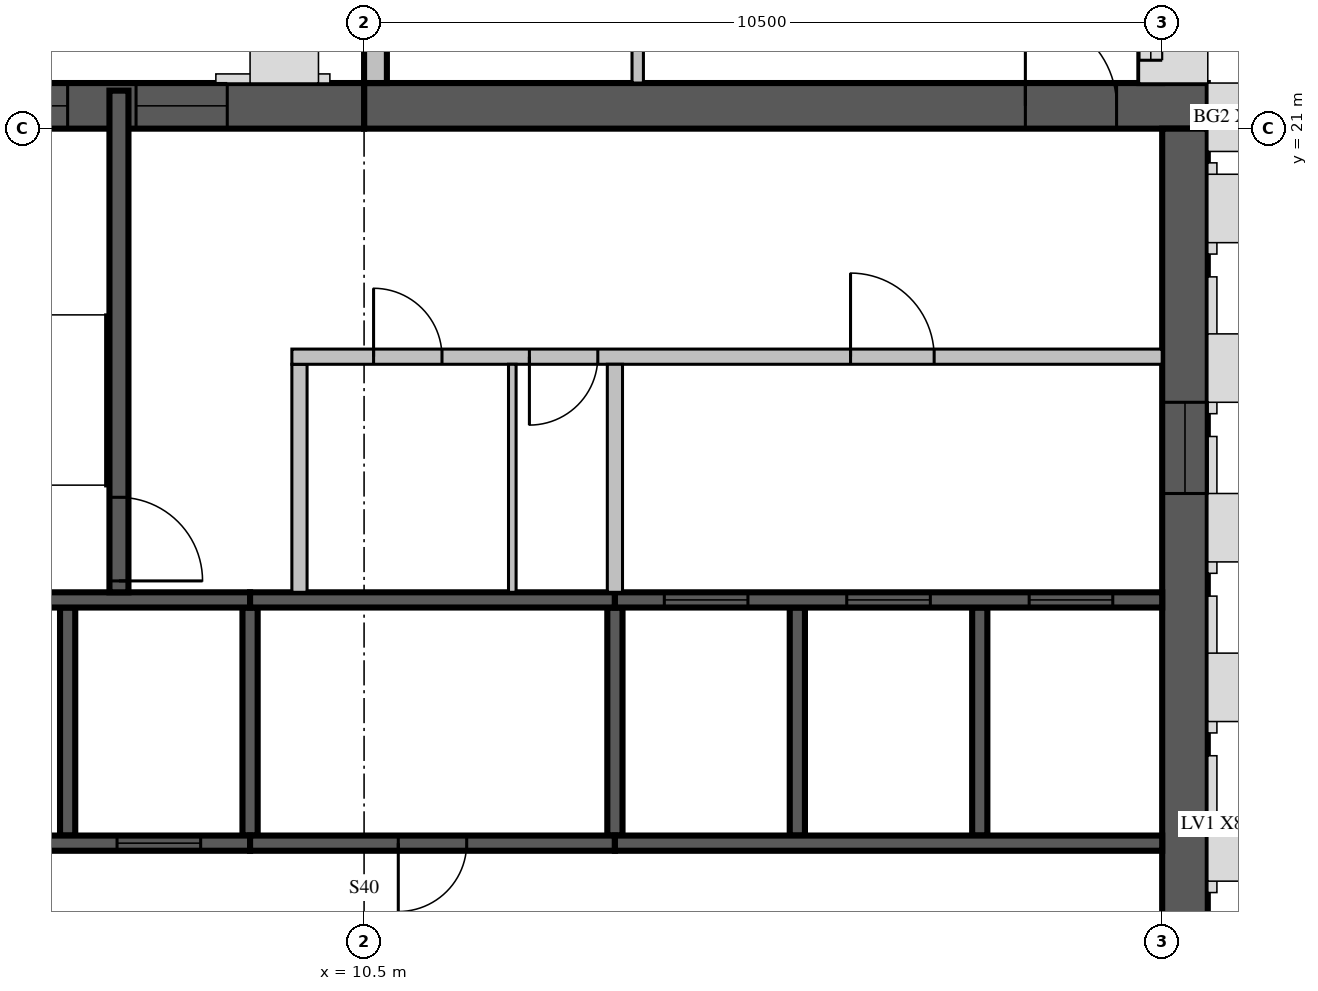
"""IFC4 building model, lengths in metres.
Left out: names, types, materials, properties, quantities, classifications, styles, units other than length and angle.
Written with IfcOpenShell. Run it as: python <this file> out.ifc"""

import sys

from ifc_helpers import new_model, si_unit, direction, frame, frame_2d, origin, place, context, subcontext, project, spatial, rectangle, extrude, source, transform, mapped, element, fill, save


model = new_model("IFC4")
c1 = context("Model", 3, precision=1e-05, world=origin(), true_north=direction((0.0, 1.0)))
c2 = subcontext(c1, "Body", "Model", "MODEL_VIEW")
j1 = project(units=[si_unit("LENGTHUNIT", "METRE"), si_unit("PLANEANGLEUNIT", "RADIAN")], contexts=[c1])
p1 = place(None, origin())
s1 = spatial("IfcSite", under=j1, at=p1, CompositionType="ELEMENT")
p2 = place(p1, origin())
s2 = spatial("IfcBuilding", under=s1, at=p2, CompositionType="ELEMENT")
p3 = place(p2, frame((0.0, 0.0, 288.0)))
s3 = spatial("IfcBuildingStorey", under=s2, at=p3, CompositionType="ELEMENT", Elevation=288.0)
m1 = source(origin(), c2, "Body", "SweptSolid", [
    extrude(rectangle(XDim=11.1, YDim=0.6, at=frame_2d((5.55, 0.0))), origin(), (0.0, 0.0, 1.0), 3.5),
])
p4 = place(p3, frame((10.5, 21.3, 0.0), z_axis=(0.0, 0.0, 1.0), x_axis=(1.0, 0.0, 0.0)))
e1 = element("IfcWall", 1, at=p4, inside=s3, PredefinedType="SHEAR", context=c2, shape_type="MappedRepresentation", body=[
    mapped(m1, transform((0.0, 0.0, 0.0), scale=1.0)),
])
m2 = source(origin(), c2, "Body", "SweptSolid", [
    extrude(rectangle(XDim=1.2, YDim=2.1, at=frame_2d((0.6, 1.05))), frame((0.0, 0.31, 0.0), z_axis=(0.0, -1.0, 0.0), x_axis=(1.0, 0.0, 0.0)), (0.0, 0.0, 1.0), 0.62),
])
p5 = place(p4, frame((8.7, 0.0, 0.0)))
e2 = element("IfcOpeningElement", 2, at=p5, cuts=e1, PredefinedType="OPENING", context=c2, shape_type="MappedRepresentation", body=[
    mapped(m2, transform((0.0, 0.0, 0.0), scale=1.0)),
])
m3 = source(origin(), c2, "Body", "SweptSolid", [
    extrude(rectangle(XDim=10.5, YDim=0.6, at=frame_2d((5.25, 0.0))), origin(), (0.0, 0.0, 1.0), 3.5),
])
p6 = place(p3, frame((21.3, 10.5, 0.0), z_axis=(0.0, 0.0, 1.0), x_axis=(0.0, 1.0, 0.0)))
e3 = element("IfcWall", 3, at=p6, inside=s3, PredefinedType="SHEAR", context=c2, shape_type="MappedRepresentation", body=[
    mapped(m3, transform((0.0, 0.0, 0.0), scale=1.0)),
])
m4 = source(origin(), c2, "Body", "SweptSolid", [
    extrude(rectangle(XDim=1.2, YDim=2.4, at=frame_2d((0.6, 1.2))), frame((0.0, 0.31, 0.0), z_axis=(0.0, -1.0, 0.0), x_axis=(1.0, 0.0, 0.0)), (0.0, 0.0, 1.0), 0.62),
])
p7 = place(p6, frame((5.7, 0.0, 0.6)))
e4 = element("IfcOpeningElement", 4, at=p7, cuts=e3, PredefinedType="OPENING", context=c2, shape_type="MappedRepresentation", body=[
    mapped(m4, transform((0.0, 0.0, 0.0), scale=1.0)),
])
m5 = source(origin(), c2, "Body", "SweptSolid", [
    extrude(rectangle(XDim=6.6, YDim=0.6, at=frame_2d((3.3, 0.0))), origin(), (0.0, 0.0, 1.0), 3.5),
])
p8 = place(p3, frame((3.9, 21.3, 0.0), z_axis=(0.0, 0.0, 1.0), x_axis=(1.0, 0.0, 0.0)))
e5 = element("IfcWall", 5, at=p8, inside=s3, PredefinedType="SHEAR", context=c2, shape_type="MappedRepresentation", body=[
    mapped(m5, transform((0.0, 0.0, 0.0), scale=1.0)),
])
p9 = place(p8, frame((1.5, 0.0, 0.6)))
e6 = element("IfcOpeningElement", 6, at=p9, cuts=e5, PredefinedType="OPENING", context=c2, shape_type="MappedRepresentation", body=[
    mapped(m4, transform((0.0, 0.0, 0.0), scale=1.0)),
])
p10 = place(p8, frame((3.6, 0.0, 0.6)))
e7 = element("IfcOpeningElement", 7, at=p10, cuts=e5, PredefinedType="OPENING", context=c2, shape_type="MappedRepresentation", body=[
    mapped(m4, transform((0.0, 0.0, 0.0), scale=1.0)),
])
m6 = source(origin(), c2, "Body", "SweptSolid", [
    extrude(rectangle(XDim=7.45, YDim=0.3, at=frame_2d((3.725, 0.0))), origin(), (0.0, 0.0, 1.0), 3.1),
])
p11 = place(p3, frame((20.85, 21.6, 0.0), z_axis=(0.0, 0.0, 1.0), x_axis=(0.0, 1.0, 0.0)))
e8 = element("IfcWall", 8, at=p11, inside=s3, PredefinedType="STANDARD", context=c2, shape_type="MappedRepresentation", body=[
    mapped(m6, transform((0.0, 0.0, 0.0), scale=1.0)),
])
m7 = source(origin(), c2, "Body", "SweptSolid", [
    extrude(rectangle(XDim=2.4, YDim=2.0, at=frame_2d((1.2, 1.0))), frame((0.0, 0.16, 0.0), z_axis=(0.0, -1.0, 0.0), x_axis=(1.0, 0.0, 0.0)), (0.0, 0.0, 1.0), 0.32),
])
p12 = place(p11, frame((0.3, 0.0, 0.6)))
e9 = element("IfcOpeningElement", 9, at=p12, cuts=e8, PredefinedType="OPENING", context=c2, shape_type="MappedRepresentation", body=[
    mapped(m7, transform((0.0, 0.0, 0.0), scale=1.0)),
])
m8 = source(origin(), c2, "Body", "SweptSolid", [
    extrude(rectangle(XDim=3.0, YDim=2.0, at=frame_2d((1.5, 1.0))), frame((0.0, 0.16, 0.0), z_axis=(0.0, -1.0, 0.0), x_axis=(1.0, 0.0, 0.0)), (0.0, 0.0, 1.0), 0.32),
])
p13 = place(p11, frame((4.2, 0.0, 0.6)))
e10 = element("IfcOpeningElement", 10, at=p13, cuts=e8, PredefinedType="OPENING", context=c2, shape_type="MappedRepresentation", body=[
    mapped(m8, transform((0.0, 0.0, 0.0), scale=1.0)),
])
p14 = place(p3, frame((10.65, 26.88, 0.0), z_axis=(0.0, 0.0, 1.0), x_axis=(0.0, -1.0, 0.0)))
e11 = element("IfcWall", 11, at=p14, inside=s3, PredefinedType="STANDARD", context=c2, shape_type="SweptSolid", body=[
    extrude(rectangle(XDim=5.28, YDim=0.3, at=frame_2d((2.64, 0.0))), origin(), (0.0, 0.0, 1.0), 3.1),
])
m9 = source(origin(), c2, "Body", "SweptSolid", [
    extrude(rectangle(XDim=3.6, YDim=2.0, at=frame_2d((1.8, 1.0))), frame((0.0, 0.16, 0.0), z_axis=(0.0, -1.0, 0.0), x_axis=(1.0, 0.0, 0.0)), (0.0, 0.0, 1.0), 0.32),
])
p15 = place(p14, frame((1.14, 0.0, 0.6)))
e12 = element("IfcOpeningElement", 12, at=p15, cuts=e11, PredefinedType="OPENING", context=c2, shape_type="MappedRepresentation", body=[
    mapped(m9, transform((0.0, 0.0, 0.0), scale=1.0)),
])
m10 = source(origin(), c2, "Body", "SweptSolid", [
    extrude(rectangle(XDim=3.0, YDim=0.2, at=frame_2d((1.5, 0.0))), origin(), (0.0, 0.0, 1.0), 3.5),
])
p16 = place(p3, frame((6.6, 11.7, 0.0), z_axis=(0.0, 0.0, 1.0), x_axis=(0.0, 1.0, 0.0)))
e13 = element("IfcWall", 13, at=p16, inside=s3, PredefinedType="SOLIDWALL", context=c2, shape_type="MappedRepresentation", body=[
    mapped(m10, transform((0.0, 0.0, 0.0), scale=1.0)),
])
m11 = source(origin(), c2, "Body", "SweptSolid", [
    extrude(rectangle(XDim=3.0, YDim=0.2, at=frame_2d((1.5, 0.0))), origin(), (0.0, 0.0, 1.0), 3.1),
])
for number, where, z_axis, x_axis in (
    (14, (9.0, 11.7, 0.0), (0.0, 0.0, 1.0), (0.0, 1.0, 0.0)),
    (15, (13.8, 11.7, 0.0), (0.0, 0.0, 1.0), (0.0, 1.0, 0.0)),
):
    element("IfcWall", number, at=place(p3, frame(where, z_axis=z_axis, x_axis=x_axis)), inside=s3, PredefinedType="SOLIDWALL", context=c2, shape_type="MappedRepresentation", body=[
        mapped(m11, transform((0.0, 0.0, 0.0), scale=1.0)),
    ])
for number, where, z_axis, x_axis in (
    (16, (16.2, 11.7, 0.0), (0.0, 0.0, 1.0), (0.0, 1.0, 0.0)),
    (17, (18.6, 11.7, 0.0), (0.0, 0.0, 1.0), (0.0, 1.0, 0.0)),
):
    element("IfcWall", number, at=place(p3, frame(where, z_axis=z_axis, x_axis=x_axis)), inside=s3, PredefinedType="SOLIDWALL", context=c2, shape_type="MappedRepresentation", body=[
        mapped(m10, transform((0.0, 0.0, 0.0), scale=1.0)),
    ])
m12 = source(origin(), c2, "Body", "SweptSolid", [
    extrude(rectangle(XDim=4.8, YDim=0.2, at=frame_2d((2.4, 0.0))), origin(), (0.0, 0.0, 1.0), 3.5),
])
p17 = place(p3, frame((4.2, 11.6, 0.0), z_axis=(0.0, 0.0, 1.0), x_axis=(1.0, 0.0, 0.0)))
e18 = element("IfcWall", 18, at=p17, inside=s3, PredefinedType="SOLIDWALL", context=c2, shape_type="MappedRepresentation", body=[
    mapped(m12, transform((0.0, 0.0, 0.0), scale=1.0)),
])
m13 = source(origin(), c2, "Body", "SweptSolid", [
    extrude(rectangle(XDim=1.1, YDim=2.1, at=frame_2d((0.55, 1.05))), frame((0.0, 0.11, 0.0), z_axis=(0.0, -1.0, 0.0), x_axis=(1.0, 0.0, 0.0)), (0.0, 0.0, 1.0), 0.22),
])
p18 = place(p17, frame((0.65, 0.0, 0.0)))
e19 = element("IfcOpeningElement", 19, at=p18, cuts=e18, PredefinedType="OPENING", context=c2, shape_type="MappedRepresentation", body=[
    mapped(m13, transform((0.0, 0.0, 0.0), scale=1.0)),
])
p19 = place(p17, frame((3.05, 0.0, 0.0)))
e20 = element("IfcOpeningElement", 20, at=p19, cuts=e18, PredefinedType="OPENING", context=c2, shape_type="MappedRepresentation", body=[
    mapped(m13, transform((0.0, 0.0, 0.0), scale=1.0)),
])
m14 = source(origin(), c2, "Body", "SweptSolid", [
    extrude(rectangle(XDim=4.8, YDim=0.2, at=frame_2d((2.4, 0.0))), origin(), (0.0, 0.0, 1.0), 3.1),
])
p20 = place(p3, frame((9.0, 11.6, 0.0), z_axis=(0.0, 0.0, 1.0), x_axis=(1.0, 0.0, 0.0)))
e21 = element("IfcWall", 21, at=p20, inside=s3, PredefinedType="SOLIDWALL", context=c2, shape_type="MappedRepresentation", body=[
    mapped(m14, transform((0.0, 0.0, 0.0), scale=1.0)),
])
m15 = source(origin(), c2, "Body", "SweptSolid", [
    extrude(rectangle(XDim=0.9, YDim=2.1, at=frame_2d((0.45, 1.05))), frame((0.0, 0.11, 0.0), z_axis=(0.0, -1.0, 0.0), x_axis=(1.0, 0.0, 0.0)), (0.0, 0.0, 1.0), 0.22),
])
p21 = place(p20, frame((1.95, 0.0, 0.0)))
e22 = element("IfcOpeningElement", 22, at=p21, cuts=e21, PredefinedType="OPENING", context=c2, shape_type="MappedRepresentation", body=[
    mapped(m15, transform((0.0, 0.0, 0.0), scale=1.0)),
])
m16 = source(origin(), c2, "Body", "SweptSolid", [
    extrude(rectangle(XDim=7.2, YDim=0.2, at=frame_2d((3.6, 0.0))), origin(), (0.0, 0.0, 1.0), 3.5),
])
p22 = place(p3, frame((13.8, 11.6, 0.0), z_axis=(0.0, 0.0, 1.0), x_axis=(1.0, 0.0, 0.0)))
e23 = element("IfcWall", 23, at=p22, inside=s3, PredefinedType="SOLIDWALL", context=c2, shape_type="MappedRepresentation", body=[
    mapped(m16, transform((0.0, 0.0, 0.0), scale=1.0)),
])
p23 = place(p3, frame((4.2, 14.8, 0.0), z_axis=(0.0, 0.0, 1.0), x_axis=(1.0, 0.0, 0.0)))
e24 = element("IfcWall", 24, at=p23, inside=s3, PredefinedType="SOLIDWALL", context=c2, shape_type="MappedRepresentation", body=[
    mapped(m12, transform((0.0, 0.0, 0.0), scale=1.0)),
])
p24 = place(p3, frame((9.0, 14.8, 0.0), z_axis=(0.0, 0.0, 1.0), x_axis=(1.0, 0.0, 0.0)))
e25 = element("IfcWall", 25, at=p24, inside=s3, PredefinedType="SOLIDWALL", context=c2, shape_type="MappedRepresentation", body=[
    mapped(m14, transform((0.0, 0.0, 0.0), scale=1.0)),
])
p25 = place(p3, frame((13.8, 14.8, 0.0), z_axis=(0.0, 0.0, 1.0), x_axis=(1.0, 0.0, 0.0)))
e26 = element("IfcWall", 26, at=p25, inside=s3, PredefinedType="SOLIDWALL", context=c2, shape_type="MappedRepresentation", body=[
    mapped(m16, transform((0.0, 0.0, 0.0), scale=1.0)),
])
p26 = place(p25, frame((0.65, 0.0, 0.0)))
e27 = element("IfcOpeningElement", 27, at=p26, cuts=e26, PredefinedType="OPENING", context=c2, shape_type="MappedRepresentation", body=[
    mapped(m13, transform((0.0, 0.0, 0.0), scale=1.0)),
])
p27 = place(p25, frame((3.05, 0.0, 0.0)))
e28 = element("IfcOpeningElement", 28, at=p27, cuts=e26, PredefinedType="OPENING", context=c2, shape_type="MappedRepresentation", body=[
    mapped(m13, transform((0.0, 0.0, 0.0), scale=1.0)),
])
p28 = place(p25, frame((5.45, 0.0, 0.0)))
e29 = element("IfcOpeningElement", 29, at=p28, cuts=e26, PredefinedType="OPENING", context=c2, shape_type="MappedRepresentation", body=[
    mapped(m13, transform((0.0, 0.0, 0.0), scale=1.0)),
])
m17 = source(origin(), c2, "Body", "SweptSolid", [
    extrude(rectangle(XDim=6.6, YDim=0.25, at=frame_2d((3.3, 0.0))), origin(), (0.0, 0.0, 1.0), 3.1),
])
p29 = place(p3, frame((7.275, 14.9, 0.0), z_axis=(0.0, 0.0, 1.0), x_axis=(0.0, 1.0, 0.0)))
e30 = element("IfcWall", 30, at=p29, inside=s3, PredefinedType="SOLIDWALL", context=c2, shape_type="MappedRepresentation", body=[
    mapped(m17, transform((0.0, 0.0, 0.0), scale=1.0)),
])
m18 = source(origin(), c2, "Body", "SweptSolid", [
    extrude(rectangle(XDim=1.1, YDim=2.1, at=frame_2d((0.55, 1.05))), frame((0.0, 0.135, 0.0), z_axis=(0.0, -1.0, 0.0), x_axis=(1.0, 0.0, 0.0)), (0.0, 0.0, 1.0), 0.27),
])
p30 = place(p29, frame((0.15, 0.0, 0.0)))
e31 = element("IfcOpeningElement", 31, at=p30, cuts=e30, PredefinedType="OPENING", context=c2, shape_type="MappedRepresentation", body=[
    mapped(m18, transform((0.0, 0.0, 0.0), scale=1.0)),
])
m19 = source(origin(), c2, "Body", "SweptSolid", [
    extrude(rectangle(XDim=3.0, YDim=0.2, at=frame_2d((1.5, 0.0))), origin(), (0.0, 0.0, 1.0), 3.1),
])
p31 = place(p3, frame((9.65, 14.9, 0.0), z_axis=(0.0, 0.0, 1.0), x_axis=(0.0, 1.0, 0.0)))
e32 = element("IfcWall", 32, at=p31, inside=s3, PredefinedType="PARTITIONING", context=c2, shape_type="MappedRepresentation", body=[
    mapped(m19, transform((0.0, 0.0, 0.0), scale=1.0)),
])
m20 = source(origin(), c2, "Body", "SweptSolid", [
    extrude(rectangle(XDim=11.45, YDim=0.2, at=frame_2d((5.725, 0.0))), origin(), (0.0, 0.0, 1.0), 3.1),
])
p32 = place(p3, frame((9.55, 18.0, 0.0), z_axis=(0.0, 0.0, 1.0), x_axis=(1.0, 0.0, 0.0)))
e33 = element("IfcWall", 33, at=p32, inside=s3, PredefinedType="PARTITIONING", context=c2, shape_type="MappedRepresentation", body=[
    mapped(m20, transform((0.0, 0.0, 0.0), scale=1.0)),
])
p33 = place(p32, frame((1.075, 0.0, 0.0)))
e34 = element("IfcOpeningElement", 34, at=p33, cuts=e33, PredefinedType="OPENING", context=c2, shape_type="MappedRepresentation", body=[
    mapped(m15, transform((0.0, 0.0, 0.0), scale=1.0)),
])
p34 = place(p32, frame((3.125, 0.0, 0.0)))
e35 = element("IfcOpeningElement", 35, at=p34, cuts=e33, PredefinedType="OPENING", context=c2, shape_type="MappedRepresentation", body=[
    mapped(m15, transform((0.0, 0.0, 0.0), scale=1.0)),
])
p35 = place(p32, frame((7.35, 0.0, 0.0)))
e36 = element("IfcOpeningElement", 36, at=p35, cuts=e33, PredefinedType="OPENING", context=c2, shape_type="MappedRepresentation", body=[
    mapped(m13, transform((0.0, 0.0, 0.0), scale=1.0)),
])
p36 = place(p3, frame((13.8, 14.9, 0.0), z_axis=(0.0, 0.0, 1.0), x_axis=(0.0, 1.0, 0.0)))
e37 = element("IfcWall", 37, at=p36, inside=s3, PredefinedType="PARTITIONING", context=c2, shape_type="MappedRepresentation", body=[
    mapped(m19, transform((0.0, 0.0, 0.0), scale=1.0)),
])
m21 = source(origin(), c2, "Body", "SweptSolid", [
    extrude(rectangle(XDim=3.0, YDim=0.1, at=frame_2d((1.5, 0.0))), origin(), (0.0, 0.0, 1.0), 3.1),
])
p37 = place(p3, frame((12.45, 14.9, 0.0), z_axis=(0.0, 0.0, 1.0), x_axis=(0.0, 1.0, 0.0)))
e38 = element("IfcWall", 38, at=p37, inside=s3, PredefinedType="PARTITIONING", context=c2, shape_type="MappedRepresentation", body=[
    mapped(m21, transform((0.0, 0.0, 0.0), scale=1.0)),
])
m22 = source(origin(), c2, "Body", "SweptSolid", [
    extrude(rectangle(XDim=7.725, YDim=0.15, at=frame_2d((3.862, 0.0))), origin(), (0.0, 0.0, 1.0), 3.1),
])
p38 = place(p3, frame((14.1, 29.325, 0.0), z_axis=(0.0, 0.0, 1.0), x_axis=(0.0, -1.0, 0.0)))
e39 = element("IfcWall", 39, at=p38, inside=s3, PredefinedType="PARTITIONING", context=c2, shape_type="MappedRepresentation", body=[
    mapped(m22, transform((0.0, 0.0, 0.0), scale=1.0)),
])
m23 = source(origin(), c2, "Body", "SweptSolid", [
    extrude(rectangle(XDim=1.0, YDim=2.1, at=frame_2d((0.5, 1.05))), frame((0.0, 0.085, 0.0), z_axis=(0.0, -1.0, 0.0), x_axis=(1.0, 0.0, 0.0)), (0.0, 0.0, 1.0), 0.17),
])
p39 = place(p38, frame((6.275, 0.0, 0.0)))
e40 = element("IfcOpeningElement", 40, at=p39, cuts=e39, PredefinedType="OPENING", context=c2, shape_type="MappedRepresentation", body=[
    mapped(m23, transform((0.0, 0.0, 0.0), scale=1.0)),
])
m24 = source(origin(), c2, "Body", "SweptSolid", [
    extrude(rectangle(XDim=2.4, YDim=2.0, at=frame_2d((1.2, 1.0))), frame((0.0, 0.03, 0.0), z_axis=(0.0, -1.0, 0.0), x_axis=(1.0, 0.0, 0.0)), (0.0, 0.0, 1.0), 0.06),
])
p40 = place(p12, origin())
e41 = element("IfcWindow", 41, at=p40, inside=s3, PartitioningType="SINGLE_PANEL", PredefinedType="WINDOW", context=c2, shape_type="MappedRepresentation", body=[
    mapped(m24, transform((0.0, 0.0, 0.0), scale=1.0)),
])
fill(e9, e41)
m25 = source(origin(), c2, "Body", "SweptSolid", [
    extrude(rectangle(XDim=1.1, YDim=2.1, at=frame_2d((0.55, 1.05))), frame((0.0, 0.025, 0.0), z_axis=(0.0, -1.0, 0.0), x_axis=(1.0, 0.0, 0.0)), (0.0, 0.0, 1.0), 0.05),
])
p41 = place(p19, origin())
e42 = element("IfcDoor", 42, at=p41, inside=s3, OperationType="SLIDING_TO_LEFT", PredefinedType="DOOR", context=c2, shape_type="MappedRepresentation", body=[
    mapped(m25, transform((0.0, 0.0, 0.0), scale=1.0)),
])
fill(e20, e42)
m26 = source(origin(), c2, "Body", "SweptSolid", [
    extrude(rectangle(XDim=0.9, YDim=2.1, at=frame_2d((0.45, 1.05))), frame((0.0, 0.025, 0.0), z_axis=(0.0, -1.0, 0.0), x_axis=(1.0, 0.0, 0.0)), (0.0, 0.0, 1.0), 0.05),
])
p42 = place(p21, origin())
e43 = element("IfcDoor", 43, at=p42, inside=s3, OperationType="SINGLE_SWING_RIGHT", PredefinedType="DOOR", context=c2, shape_type="MappedRepresentation", body=[
    mapped(m26, transform((0.0, 0.0, 0.0), scale=1.0)),
])
fill(e22, e43)
p43 = place(p26, origin())
e44 = element("IfcDoor", 44, at=p43, inside=s3, OperationType="SLIDING_TO_LEFT", PredefinedType="DOOR", context=c2, shape_type="MappedRepresentation", body=[
    mapped(m25, transform((0.0, 0.0, 0.0), scale=1.0)),
])
fill(e27, e44)
p44 = place(p27, origin())
e45 = element("IfcDoor", 45, at=p44, inside=s3, OperationType="SLIDING_TO_LEFT", PredefinedType="DOOR", context=c2, shape_type="MappedRepresentation", body=[
    mapped(m25, transform((0.0, 0.0, 0.0), scale=1.0)),
])
fill(e28, e45)
p45 = place(p28, origin())
e46 = element("IfcDoor", 46, at=p45, inside=s3, OperationType="SLIDING_TO_LEFT", PredefinedType="DOOR", context=c2, shape_type="MappedRepresentation", body=[
    mapped(m25, transform((0.0, 0.0, 0.0), scale=1.0)),
])
fill(e29, e46)
p46 = place(p30, origin())
e47 = element("IfcDoor", 47, at=p46, inside=s3, OperationType="SINGLE_SWING_RIGHT", PredefinedType="DOOR", context=c2, shape_type="MappedRepresentation", body=[
    mapped(m25, transform((0.0, 0.0, 0.0), scale=1.0)),
])
fill(e31, e47)
p47 = place(p33, origin())
e48 = element("IfcDoor", 48, at=p47, inside=s3, OperationType="SINGLE_SWING_LEFT", PredefinedType="DOOR", context=c2, shape_type="MappedRepresentation", body=[
    mapped(m26, transform((0.0, 0.0, 0.0), scale=1.0)),
])
fill(e34, e48)
p48 = place(p34, origin())
e49 = element("IfcDoor", 49, at=p48, inside=s3, OperationType="SINGLE_SWING_RIGHT", PredefinedType="DOOR", context=c2, shape_type="MappedRepresentation", body=[
    mapped(m26, transform((0.0, 0.0, 0.0), scale=1.0)),
])
fill(e35, e49)
p49 = place(p35, origin())
e50 = element("IfcDoor", 50, at=p49, inside=s3, OperationType="SINGLE_SWING_LEFT", PredefinedType="DOOR", context=c2, shape_type="MappedRepresentation", body=[
    mapped(m25, transform((0.0, 0.0, 0.0), scale=1.0)),
])
fill(e36, e50)
m27 = source(origin(), c2, "Body", "SweptSolid", [
    extrude(rectangle(XDim=1.2, YDim=2.1, at=frame_2d((0.6, 1.05))), frame((0.0, 0.025, 0.0), z_axis=(0.0, -1.0, 0.0), x_axis=(1.0, 0.0, 0.0)), (0.0, 0.0, 1.0), 0.05),
])
p50 = place(p5, origin())
e51 = element("IfcDoor", 51, at=p50, inside=s3, OperationType="SINGLE_SWING_LEFT", PredefinedType="DOOR", context=c2, shape_type="MappedRepresentation", body=[
    mapped(m27, transform((0.0, 0.0, 0.0), scale=1.0)),
])
fill(e2, e51)
m28 = source(origin(), c2, "Body", "SweptSolid", [
    extrude(rectangle(XDim=1.2, YDim=2.4, at=frame_2d((0.6, 1.2))), frame((0.0, 0.03, 0.0), z_axis=(0.0, -1.0, 0.0), x_axis=(1.0, 0.0, 0.0)), (0.0, 0.0, 1.0), 0.06),
])
p51 = place(p7, origin())
e52 = element("IfcWindow", 52, at=p51, inside=s3, PartitioningType="SINGLE_PANEL", PredefinedType="WINDOW", context=c2, shape_type="MappedRepresentation", body=[
    mapped(m28, transform((0.0, 0.0, 0.0), scale=1.0)),
])
fill(e4, e52)
p52 = place(p9, origin())
e53 = element("IfcWindow", 53, at=p52, inside=s3, PartitioningType="SINGLE_PANEL", PredefinedType="WINDOW", context=c2, shape_type="MappedRepresentation", body=[
    mapped(m28, transform((0.0, 0.0, 0.0), scale=1.0)),
])
fill(e6, e53)
p53 = place(p10, origin())
e54 = element("IfcWindow", 54, at=p53, inside=s3, PartitioningType="SINGLE_PANEL", PredefinedType="WINDOW", context=c2, shape_type="MappedRepresentation", body=[
    mapped(m28, transform((0.0, 0.0, 0.0), scale=1.0)),
])
fill(e7, e54)
save(model, sys.argv[1])
